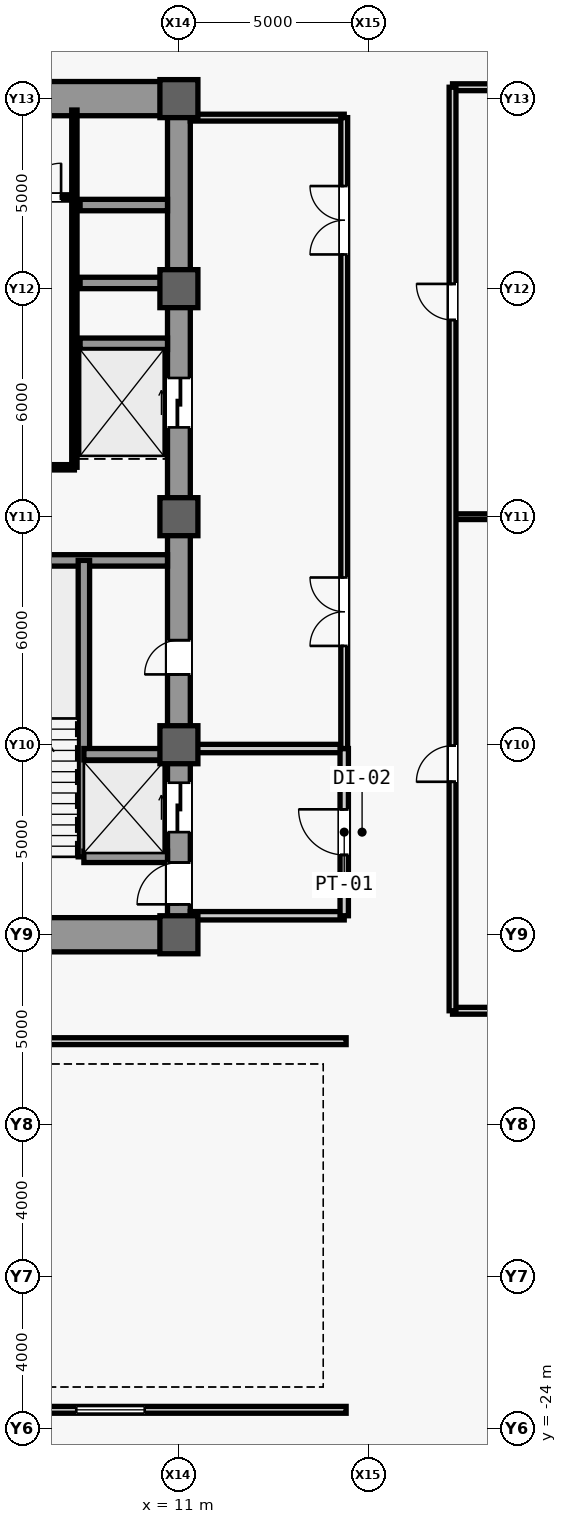
"""IFC4 building model, lengths in metres.
Left out: names, types, materials, properties, quantities, classifications, styles, units other than length and angle.
Written with IfcOpenShell. Run it as: python <this file> out.ifc"""

import sys

from ifc_helpers import new_model, si_unit, direction, frame, frame_2d, origin, origin_2d, place, context, subcontext, project, spatial, rectangle, extrude, source, transform, mapped, element, fill, save


model = new_model("IFC4")
c1 = context("Model", 3, precision=1e-05, world=origin(), true_north=direction((0.0, 1.0)))
c2 = subcontext(c1, "Body", "Model", "MODEL_VIEW")
j1 = project(units=[si_unit("LENGTHUNIT", "METRE"), si_unit("PLANEANGLEUNIT", "RADIAN")], contexts=[c1])
p1 = place(None, origin())
s1 = spatial("IfcSite", under=j1, at=p1, CompositionType="ELEMENT")
p2 = place(p1, origin())
s2 = spatial("IfcBuilding", under=s1, at=p2, CompositionType="ELEMENT")
p3 = place(p2, frame((0.0, 0.0, 17.4)))
s3 = spatial("IfcBuildingStorey", under=s2, at=p3, CompositionType="ELEMENT", Elevation=17.4)
m1 = source(origin(), c2, "Body", "SweptSolid", [
    extrude(rectangle(XDim=22.0, YDim=0.6, at=frame_2d((11.0, 0.0))), origin(), (0.0, 0.0, 1.0), 4.48),
])
p4 = place(p3, frame((11.0, -11.0, 0.0), z_axis=(0.0, 0.0, 1.0), x_axis=(0.0, 1.0, 0.0)))
e1 = element("IfcWall", 1, at=p4, inside=s3, PredefinedType="SHEAR", context=c2, shape_type="MappedRepresentation", body=[
    mapped(m1, transform((0.0, 0.0, 0.0), scale=1.0)),
])
m2 = source(origin(), c2, "Body", "SweptSolid", [
    extrude(rectangle(XDim=1.1, YDim=2.2, at=frame_2d((0.55, 1.1))), frame((0.0, 0.31, 0.0), z_axis=(0.0, -1.0, 0.0), x_axis=(1.0, 0.0, 0.0)), (0.0, 0.0, 1.0), 0.62),
])
p5 = place(p4, frame((0.8, 0.0, 0.0)))
e2 = element("IfcOpeningElement", 2, at=p5, cuts=e1, PredefinedType="OPENING", context=c2, shape_type="MappedRepresentation", body=[
    mapped(m2, transform((0.0, 0.0, 0.0), scale=1.0)),
])
m3 = source(origin(), c2, "Body", "SweptSolid", [
    extrude(rectangle(XDim=0.9, YDim=2.15, at=frame_2d((0.45, 1.075))), frame((0.0, 0.31, 0.0), z_axis=(0.0, -1.0, 0.0), x_axis=(1.0, 0.0, 0.0)), (0.0, 0.0, 1.0), 0.62),
])
p6 = place(p4, frame((6.85, 0.0, 0.0)))
e3 = element("IfcOpeningElement", 3, at=p6, cuts=e1, PredefinedType="OPENING", context=c2, shape_type="MappedRepresentation", body=[
    mapped(m3, transform((0.0, 0.0, 0.0), scale=1.0)),
])
m4 = source(origin(), c2, "Body", "SweptSolid", [
    extrude(rectangle(XDim=1.3, YDim=2.3, at=frame_2d((0.65, 1.15))), frame((0.0, 0.31, 0.0), z_axis=(0.0, -1.0, 0.0), x_axis=(1.0, 0.0, 0.0)), (0.0, 0.0, 1.0), 0.62),
])
p7 = place(p4, frame((2.7, 0.0, 0.0)))
e4 = element("IfcOpeningElement", 4, at=p7, cuts=e1, PredefinedType="OPENING", context=c2, shape_type="MappedRepresentation", body=[
    mapped(m4, transform((0.0, 0.0, 0.0), scale=1.0)),
])
p8 = place(p4, frame((13.35, 0.0, 0.0)))
e5 = element("IfcOpeningElement", 5, at=p8, cuts=e1, PredefinedType="OPENING", context=c2, shape_type="MappedRepresentation", body=[
    mapped(m4, transform((0.0, 0.0, 0.0), scale=1.0)),
])
m5 = source(origin(), c2, "Body", "SweptSolid", [
    extrude(rectangle(XDim=5.85, YDim=0.9, at=frame_2d((2.925, 0.0))), origin(), (0.0, 0.0, 1.0), 4.48),
])
p9 = place(p3, frame((4.85, -11.0, 0.0), z_axis=(0.0, 0.0, 1.0), x_axis=(1.0, 0.0, 0.0)))
e6 = element("IfcWall", 6, at=p9, inside=s3, PredefinedType="SHEAR", context=c2, shape_type="MappedRepresentation", body=[
    mapped(m5, transform((0.0, 0.0, 0.0), scale=1.0)),
])
p10 = place(p3, frame((4.85, 11.0, 0.0), z_axis=(0.0, 0.0, 1.0), x_axis=(1.0, 0.0, 0.0)))
e7 = element("IfcWall", 7, at=p10, inside=s3, PredefinedType="SHEAR", context=c2, shape_type="MappedRepresentation", body=[
    mapped(m5, transform((0.0, 0.0, 0.0), scale=1.0)),
])
m6 = source(origin(), c2, "Body", "SweptSolid", [
    extrude(rectangle(XDim=1.05, YDim=2.2, at=frame_2d((0.525, 1.1))), frame((0.0, 0.46, 0.0), z_axis=(0.0, -1.0, 0.0), x_axis=(1.0, 0.0, 0.0)), (0.0, 0.0, 1.0), 0.92),
])
p11 = place(p10, frame((1.375, 0.0, 0.0)))
e8 = element("IfcOpeningElement", 8, at=p11, cuts=e7, PredefinedType="OPENING", context=c2, shape_type="MappedRepresentation", body=[
    mapped(m6, transform((0.0, 0.0, 0.0), scale=1.0)),
])
m7 = source(origin(), c2, "Body", "SweptSolid", [
    extrude(rectangle(XDim=5.6, YDim=0.3, at=frame_2d((2.8, 0.0))), origin(), (0.0, 0.0, 1.0), 4.48),
])
p12 = place(p3, frame((5.1, -1.15, 0.0), z_axis=(0.0, 0.0, 1.0), x_axis=(1.0, 0.0, 0.0)))
e9 = element("IfcWall", 9, at=p12, inside=s3, PredefinedType="SHEAR", context=c2, shape_type="MappedRepresentation", body=[
    mapped(m7, transform((0.0, 0.0, 0.0), scale=1.0)),
])
m8 = source(origin(), c2, "Body", "SweptSolid", [
    extrude(rectangle(XDim=1.0, YDim=1.0, at=origin_2d()), origin(), (0.0, 0.0, 1.0), 4.8),
])
for number, where, z_axis, x_axis in (
    (10, (11.0, -11.0, 0.0), (0.0, 0.0, 1.0), (1.0, 0.0, 0.0)),
    (11, (11.0, -6.0, 0.0), (0.0, 0.0, 1.0), (1.0, 0.0, 0.0)),
    (12, (11.0, 0.0, 0.0), (0.0, 0.0, 1.0), (1.0, 0.0, 0.0)),
    (13, (11.0, 6.0, 0.0), (0.0, 0.0, 1.0), (1.0, 0.0, 0.0)),
    (14, (11.0, 11.0, 0.0), (0.0, 0.0, 1.0), (1.0, 0.0, 0.0)),
):
    element("IfcColumn", number, at=place(p3, frame(where, z_axis=z_axis, x_axis=x_axis)), inside=s3, PredefinedType="COLUMN", context=c2, shape_type="MappedRepresentation", body=[
        mapped(m8, transform((0.0, 0.0, 0.0), scale=1.0)),
    ])
m9 = source(origin(), c2, "Body", "SweptSolid", [
    extrude(rectangle(XDim=7.8, YDim=0.3, at=frame_2d((3.9, 0.0))), origin(), (0.0, 0.0, 1.0), 4.48),
])
p13 = place(p3, frame((8.5, -8.95, 0.0), z_axis=(0.0, 0.0, 1.0), x_axis=(0.0, 1.0, 0.0)))
e15 = element("IfcWall", 15, at=p13, inside=s3, PredefinedType="SHEAR", context=c2, shape_type="MappedRepresentation", body=[
    mapped(m9, transform((0.0, 0.0, 0.0), scale=1.0)),
])
m10 = source(origin(), c2, "Body", "SweptSolid", [
    extrude(rectangle(XDim=2.2, YDim=0.3, at=frame_2d((1.1, 0.0))), origin(), (0.0, 0.0, 1.0), 4.48),
])
for number, where, z_axis, x_axis in (
    (16, (8.5, -8.95, 0.0), (0.0, 0.0, 1.0), (1.0, 0.0, 0.0)),
    (17, (8.5, -6.25, 0.0), (0.0, 0.0, 1.0), (1.0, 0.0, 0.0)),
):
    element("IfcWall", number, at=place(p3, frame(where, z_axis=z_axis, x_axis=x_axis)), inside=s3, PredefinedType="SHEAR", context=c2, shape_type="MappedRepresentation", body=[
        mapped(m10, transform((0.0, 0.0, 0.0), scale=1.0)),
    ])
m11 = source(origin(), c2, "Body", "SweptSolid", [
    extrude(rectangle(XDim=2.3, YDim=0.3, at=frame_2d((1.15, 0.0))), origin(), (0.0, 0.0, 1.0), 4.48),
])
for number, where, z_axis, x_axis in (
    (18, (8.4, 4.55, 0.0), (0.0, 0.0, 1.0), (1.0, 0.0, 0.0)),
    (19, (8.4, 6.15, 0.0), (0.0, 0.0, 1.0), (1.0, 0.0, 0.0)),
    (20, (8.4, 8.2, 0.0), (0.0, 0.0, 1.0), (1.0, 0.0, 0.0)),
):
    element("IfcWall", number, at=place(p3, frame(where, z_axis=z_axis, x_axis=x_axis)), inside=s3, PredefinedType="SHEAR", context=c2, shape_type="MappedRepresentation", body=[
        mapped(m11, transform((0.0, 0.0, 0.0), scale=1.0)),
    ])
m12 = source(origin(), c2, "Body", "SweptSolid", [
    extrude(rectangle(XDim=9.4, YDim=0.14, at=frame_2d((4.7, 0.0))), origin(), (0.0, 0.0, 1.0), 4.48),
])
p14 = place(p3, frame((8.25, 1.3, 0.0), z_axis=(0.0, 0.0, 1.0), x_axis=(0.0, 1.0, 0.0)))
e21 = element("IfcWall", 21, at=p14, inside=s3, PredefinedType="PARTITIONING", context=c2, shape_type="MappedRepresentation", body=[
    mapped(m12, transform((0.0, 0.0, 0.0), scale=1.0)),
])
m13 = source(origin(), c2, "Body", "SweptSolid", [
    extrude(rectangle(XDim=3.15, YDim=0.14, at=frame_2d((1.575, 0.0))), origin(), (0.0, 0.0, 1.0), 4.48),
])
p15 = place(p3, frame((5.1, 1.3, 0.0), z_axis=(0.0, 0.0, 1.0), x_axis=(1.0, 0.0, 0.0)))
e22 = element("IfcWall", 22, at=p15, inside=s3, PredefinedType="PARTITIONING", context=c2, shape_type="MappedRepresentation", body=[
    mapped(m13, transform((0.0, 0.0, 0.0), scale=1.0)),
])
p16 = place(p3, frame((5.1, 8.4, 0.0), z_axis=(0.0, 0.0, 1.0), x_axis=(1.0, 0.0, 0.0)))
e23 = element("IfcWall", 23, at=p16, inside=s3, PredefinedType="PARTITIONING", context=c2, shape_type="MappedRepresentation", body=[
    mapped(m13, transform((0.0, 0.0, 0.0), scale=1.0)),
])
m14 = source(origin(), c2, "Body", "SweptSolid", [
    extrude(rectangle(XDim=0.9, YDim=2.15, at=frame_2d((0.45, 1.075))), frame((0.0, 0.08, 0.0), z_axis=(0.0, -1.0, 0.0), x_axis=(1.0, 0.0, 0.0)), (0.0, 0.0, 1.0), 0.16),
])
p17 = place(p16, frame((0.33, 0.0, 0.0)))
e24 = element("IfcOpeningElement", 24, at=p17, cuts=e23, PredefinedType="OPENING", context=c2, shape_type="MappedRepresentation", body=[
    mapped(m14, transform((0.0, 0.0, 0.0), scale=1.0)),
])
p18 = place(p16, frame((1.9, 0.0, 0.0)))
e25 = element("IfcOpeningElement", 25, at=p18, cuts=e23, PredefinedType="OPENING", context=c2, shape_type="MappedRepresentation", body=[
    mapped(m14, transform((0.0, 0.0, 0.0), scale=1.0)),
])
m15 = source(origin(), c2, "Body", "SweptSolid", [
    extrude(rectangle(XDim=4.05, YDim=0.22, at=frame_2d((2.025, 0.0))), origin(), (0.0, 0.0, 1.0), 4.48),
])
for number, where, z_axis, x_axis in (
    (26, (11.3, -10.5, 0.0), (0.0, 0.0, 1.0), (1.0, 0.0, 0.0)),
    (27, (11.3, -6.1, 0.0), (0.0, 0.0, 1.0), (1.0, 0.0, 0.0)),
):
    element("IfcWall", number, at=place(p3, frame(where, z_axis=z_axis, x_axis=x_axis)), inside=s3, PredefinedType="PARTITIONING", context=c2, shape_type="MappedRepresentation", body=[
        mapped(m15, transform((0.0, 0.0, 0.0), scale=1.0)),
    ])
m16 = source(origin(), c2, "Body", "SweptSolid", [
    extrude(rectangle(XDim=4.4, YDim=0.22, at=frame_2d((2.2, 0.0))), origin(), (0.0, 0.0, 1.0), 4.48),
])
p19 = place(p3, frame((15.35, -10.5, 0.0), z_axis=(0.0, 0.0, 1.0), x_axis=(0.0, 1.0, 0.0)))
e28 = element("IfcWall", 28, at=p19, inside=s3, PredefinedType="PARTITIONING", context=c2, shape_type="MappedRepresentation", body=[
    mapped(m16, transform((0.0, 0.0, 0.0), scale=1.0)),
])
m17 = source(origin(), c2, "Body", "SweptSolid", [
    extrude(rectangle(XDim=1.2, YDim=2.2, at=frame_2d((0.6, 1.1))), frame((0.0, 0.12, 0.0), z_axis=(0.0, -1.0, 0.0), x_axis=(1.0, 0.0, 0.0)), (0.0, 0.0, 1.0), 0.24),
])
p20 = place(p19, frame((1.6, 0.0, 0.0)))
e29 = element("IfcOpeningElement", 29, at=p20, cuts=e28, PredefinedType="OPENING", context=c2, shape_type="MappedRepresentation", body=[
    mapped(m17, transform((0.0, 0.0, 0.0), scale=1.0)),
])
m18 = source(origin(), c2, "Body", "SweptSolid", [
    extrude(rectangle(XDim=4.05, YDim=0.18, at=frame_2d((2.025, 0.0))), origin(), (0.0, 0.0, 1.0), 4.48),
])
p21 = place(p3, frame((11.3, 10.5, 0.0), z_axis=(0.0, 0.0, 1.0), x_axis=(1.0, 0.0, 0.0)))
e30 = element("IfcWall", 30, at=p21, inside=s3, PredefinedType="PARTITIONING", context=c2, shape_type="MappedRepresentation", body=[
    mapped(m18, transform((0.0, 0.0, 0.0), scale=1.0)),
])
m19 = source(origin(), c2, "Body", "SweptSolid", [
    extrude(rectangle(XDim=16.6, YDim=0.18, at=frame_2d((8.3, 0.0))), origin(), (0.0, 0.0, 1.0), 4.48),
])
p22 = place(p3, frame((15.35, -6.1, 0.0), z_axis=(0.0, 0.0, 1.0), x_axis=(0.0, 1.0, 0.0)))
e31 = element("IfcWall", 31, at=p22, inside=s3, PredefinedType="PARTITIONING", context=c2, shape_type="MappedRepresentation", body=[
    mapped(m19, transform((0.0, 0.0, 0.0), scale=1.0)),
])
m20 = source(origin(), c2, "Body", "SweptSolid", [
    extrude(rectangle(XDim=1.8, YDim=2.25, at=frame_2d((0.9, 1.125))), frame((0.0, 0.1, 0.0), z_axis=(0.0, -1.0, 0.0), x_axis=(1.0, 0.0, 0.0)), (0.0, 0.0, 1.0), 0.2),
])
p23 = place(p22, frame((2.7, 0.0, 0.0)))
e32 = element("IfcOpeningElement", 32, at=p23, cuts=e31, PredefinedType="OPENING", context=c2, shape_type="MappedRepresentation", body=[
    mapped(m20, transform((0.0, 0.0, 0.0), scale=1.0)),
])
p24 = place(p22, frame((13.0, 0.0, 0.0)))
e33 = element("IfcOpeningElement", 33, at=p24, cuts=e31, PredefinedType="OPENING", context=c2, shape_type="MappedRepresentation", body=[
    mapped(m20, transform((0.0, 0.0, 0.0), scale=1.0)),
])
m21 = source(origin(), c2, "Body", "SweptSolid", [
    extrude(rectangle(XDim=30.8, YDim=0.18, at=frame_2d((15.4, 0.0))), origin(), (0.0, 0.0, 1.0), 4.48),
])
p25 = place(p3, frame((-15.4, -13.8, 0.0), z_axis=(0.0, 0.0, 1.0), x_axis=(1.0, 0.0, 0.0)))
e34 = element("IfcWall", 34, at=p25, inside=s3, PredefinedType="PARTITIONING", context=c2, shape_type="MappedRepresentation", body=[
    mapped(m21, transform((0.0, 0.0, 0.0), scale=1.0)),
])
p26 = place(p25, frame((14.5, 0.0, 0.0)))
e35 = element("IfcOpeningElement", 35, at=p26, cuts=e34, PredefinedType="OPENING", context=c2, shape_type="MappedRepresentation", body=[
    mapped(m20, transform((0.0, 0.0, 0.0), scale=1.0)),
])
p27 = place(p3, frame((-15.4, -23.5, 0.0), z_axis=(0.0, 0.0, 1.0), x_axis=(1.0, 0.0, 0.0)))
e36 = element("IfcWall", 36, at=p27, inside=s3, PredefinedType="PARTITIONING", context=c2, shape_type="MappedRepresentation", body=[
    mapped(m21, transform((0.0, 0.0, 0.0), scale=1.0)),
])
m22 = source(origin(), c2, "Body", "SweptSolid", [
    extrude(rectangle(XDim=1.8, YDim=1.4, at=frame_2d((0.9, 0.7))), frame((0.0, 0.1, 0.0), z_axis=(0.0, -1.0, 0.0), x_axis=(1.0, 0.0, 0.0)), (0.0, 0.0, 1.0), 0.2),
])
p28 = place(p27, frame((3.5, 0.0, 0.9)))
e37 = element("IfcOpeningElement", 37, at=p28, cuts=e36, PredefinedType="OPENING", context=c2, shape_type="MappedRepresentation", body=[
    mapped(m22, transform((0.0, 0.0, 0.0), scale=1.0)),
])
p29 = place(p27, frame((14.5, 0.0, 0.9)))
e38 = element("IfcOpeningElement", 38, at=p29, cuts=e36, PredefinedType="OPENING", context=c2, shape_type="MappedRepresentation", body=[
    mapped(m22, transform((0.0, 0.0, 0.0), scale=1.0)),
])
p30 = place(p27, frame((23.7, 0.0, 0.9)))
e39 = element("IfcOpeningElement", 39, at=p30, cuts=e36, PredefinedType="OPENING", context=c2, shape_type="MappedRepresentation", body=[
    mapped(m22, transform((0.0, 0.0, 0.0), scale=1.0)),
])
m23 = source(origin(), c2, "Body", "SweptSolid", [
    extrude(rectangle(XDim=11.8, YDim=0.18, at=frame_2d((5.9, 0.0))), origin(), (0.0, 0.0, 1.0), 2.68),
])
p31 = place(p3, frame((18.2, 11.3, 0.0), z_axis=(0.0, 0.0, 1.0), x_axis=(1.0, 0.0, 0.0)))
e40 = element("IfcWall", 40, at=p31, inside=s3, PredefinedType="PARTITIONING", context=c2, shape_type="MappedRepresentation", body=[
    mapped(m23, transform((0.0, 0.0, 0.0), scale=1.0)),
])
m24 = source(origin(), c2, "Body", "SweptSolid", [
    extrude(rectangle(XDim=21.8, YDim=0.18, at=frame_2d((10.9, 0.0))), origin(), (0.0, 0.0, 1.0), 4.48),
])
p32 = place(p3, frame((18.2, -13.0, 0.0), z_axis=(0.0, 0.0, 1.0), x_axis=(1.0, 0.0, 0.0)))
e41 = element("IfcWall", 41, at=p32, inside=s3, PredefinedType="PARTITIONING", context=c2, shape_type="MappedRepresentation", body=[
    mapped(m24, transform((0.0, 0.0, 0.0), scale=1.0)),
])
m25 = source(origin(), c2, "Body", "SweptSolid", [
    extrude(rectangle(XDim=21.8, YDim=0.15, at=frame_2d((10.9, 0.0))), origin(), (0.0, 0.0, 1.0), 2.68),
])
p33 = place(p3, frame((18.2, 0.0, 0.0), z_axis=(0.0, 0.0, 1.0), x_axis=(1.0, 0.0, 0.0)))
e42 = element("IfcWall", 42, at=p33, inside=s3, PredefinedType="PARTITIONING", context=c2, shape_type="MappedRepresentation", body=[
    mapped(m25, transform((0.0, 0.0, 0.0), scale=1.0)),
])
m26 = source(origin(), c2, "Body", "SweptSolid", [
    extrude(rectangle(XDim=24.3, YDim=0.18, at=frame_2d((12.15, 0.0))), origin(), (0.0, 0.0, 1.0), 4.48),
])
p34 = place(p3, frame((18.2, -13.0, 0.0), z_axis=(0.0, 0.0, 1.0), x_axis=(0.0, 1.0, 0.0)))
e43 = element("IfcWall", 43, at=p34, inside=s3, PredefinedType="PARTITIONING", context=c2, shape_type="MappedRepresentation", body=[
    mapped(m26, transform((0.0, 0.0, 0.0), scale=1.0)),
])
m27 = source(origin(), c2, "Body", "SweptSolid", [
    extrude(rectangle(XDim=0.95, YDim=2.15, at=frame_2d((0.475, 1.075))), frame((0.0, 0.1, 0.0), z_axis=(0.0, -1.0, 0.0), x_axis=(1.0, 0.0, 0.0)), (0.0, 0.0, 1.0), 0.2),
])
p35 = place(p34, frame((6.025, 0.0, 0.0)))
e44 = element("IfcOpeningElement", 44, at=p35, cuts=e43, PredefinedType="OPENING", context=c2, shape_type="MappedRepresentation", body=[
    mapped(m27, transform((0.0, 0.0, 0.0), scale=1.0)),
])
p36 = place(p34, frame((18.175, 0.0, 0.0)))
e45 = element("IfcOpeningElement", 45, at=p36, cuts=e43, PredefinedType="OPENING", context=c2, shape_type="MappedRepresentation", body=[
    mapped(m27, transform((0.0, 0.0, 0.0), scale=1.0)),
])
m28 = source(origin(), c2, "Body", "SweptSolid", [
    extrude(rectangle(XDim=1.1, YDim=2.2, at=frame_2d((0.55, 1.1))), frame((0.0, 0.025, 0.0), z_axis=(0.0, -1.0, 0.0), x_axis=(1.0, 0.0, 0.0)), (0.0, 0.0, 1.0), 0.05),
])
p37 = place(p5, origin())
e46 = element("IfcDoor", 46, at=p37, inside=s3, OperationType="SINGLE_SWING_LEFT", PredefinedType="DOOR", context=c2, shape_type="MappedRepresentation", body=[
    mapped(m28, transform((0.0, 0.0, 0.0), scale=1.0)),
])
fill(e2, e46)
m29 = source(origin(), c2, "Body", "SweptSolid", [
    extrude(rectangle(XDim=0.9, YDim=2.15, at=frame_2d((0.45, 1.075))), frame((0.0, 0.025, 0.0), z_axis=(0.0, -1.0, 0.0), x_axis=(1.0, 0.0, 0.0)), (0.0, 0.0, 1.0), 0.05),
])
p38 = place(p6, origin())
e47 = element("IfcDoor", 47, at=p38, inside=s3, OperationType="SINGLE_SWING_LEFT", PredefinedType="DOOR", context=c2, shape_type="MappedRepresentation", body=[
    mapped(m29, transform((0.0, 0.0, 0.0), scale=1.0)),
])
fill(e3, e47)
p39 = place(p18, origin())
e48 = element("IfcDoor", 48, at=p39, inside=s3, OperationType="SINGLE_SWING_RIGHT", PredefinedType="DOOR", context=c2, shape_type="MappedRepresentation", body=[
    mapped(m29, transform((0.0, 0.0, 0.0), scale=1.0)),
])
fill(e25, e48)
m30 = source(origin(), c2, "Body", "SweptSolid", [
    extrude(rectangle(XDim=1.2, YDim=2.2, at=frame_2d((0.6, 1.1))), frame((0.0, 0.025, 0.0), z_axis=(0.0, -1.0, 0.0), x_axis=(1.0, 0.0, 0.0)), (0.0, 0.0, 1.0), 0.05),
])
p40 = place(p20, origin())
e49 = element("IfcDoor", 49, at=p40, inside=s3, OperationType="SINGLE_SWING_RIGHT", PredefinedType="DOOR", context=c2, shape_type="MappedRepresentation", body=[
    mapped(m30, transform((0.0, 0.0, 0.0), scale=1.0)),
])
fill(e29, e49)
m31 = source(origin(), c2, "Body", "SweptSolid", [
    extrude(rectangle(XDim=1.8, YDim=2.25, at=frame_2d((0.9, 1.125))), frame((0.0, 0.025, 0.0), z_axis=(0.0, -1.0, 0.0), x_axis=(1.0, 0.0, 0.0)), (0.0, 0.0, 1.0), 0.05),
])
p41 = place(p23, origin())
e50 = element("IfcDoor", 50, at=p41, inside=s3, OperationType="SINGLE_SWING_RIGHT", PredefinedType="DOOR", context=c2, shape_type="MappedRepresentation", body=[
    mapped(m31, transform((0.0, 0.0, 0.0), scale=1.0)),
])
fill(e32, e50)
p42 = place(p24, origin())
e51 = element("IfcDoor", 51, at=p42, inside=s3, OperationType="SINGLE_SWING_LEFT", PredefinedType="DOOR", context=c2, shape_type="MappedRepresentation", body=[
    mapped(m31, transform((0.0, 0.0, 0.0), scale=1.0)),
])
fill(e33, e51)
m32 = source(origin(), c2, "Body", "SweptSolid", [
    extrude(rectangle(XDim=0.95, YDim=2.15, at=frame_2d((0.475, 1.075))), frame((0.0, 0.025, 0.0), z_axis=(0.0, -1.0, 0.0), x_axis=(1.0, 0.0, 0.0)), (0.0, 0.0, 1.0), 0.05),
])
p43 = place(p35, origin())
e52 = element("IfcDoor", 52, at=p43, inside=s3, OperationType="SINGLE_SWING_LEFT", PredefinedType="DOOR", context=c2, shape_type="MappedRepresentation", body=[
    mapped(m32, transform((0.0, 0.0, 0.0), scale=1.0)),
])
fill(e44, e52)
p44 = place(p36, origin())
e53 = element("IfcDoor", 53, at=p44, inside=s3, OperationType="SINGLE_SWING_RIGHT", PredefinedType="DOOR", context=c2, shape_type="MappedRepresentation", body=[
    mapped(m32, transform((0.0, 0.0, 0.0), scale=1.0)),
])
fill(e45, e53)
m33 = source(origin(), c2, "Body", "SweptSolid", [
    extrude(rectangle(XDim=1.8, YDim=1.4, at=frame_2d((0.9, 0.7))), frame((0.0, 0.03, 0.0), z_axis=(0.0, -1.0, 0.0), x_axis=(1.0, 0.0, 0.0)), (0.0, 0.0, 1.0), 0.06),
])
p45 = place(p30, origin())
e54 = element("IfcWindow", 54, at=p45, inside=s3, PartitioningType="SINGLE_PANEL", PredefinedType="WINDOW", context=c2, shape_type="MappedRepresentation", body=[
    mapped(m33, transform((0.0, 0.0, 0.0), scale=1.0)),
])
fill(e39, e54)
m34 = source(origin(), c2, "Body", "SweptSolid", [
    extrude(rectangle(XDim=1.3, YDim=2.3, at=frame_2d((0.65, 1.15))), frame((0.0, 0.025, 0.0), z_axis=(0.0, -1.0, 0.0), x_axis=(1.0, 0.0, 0.0)), (0.0, 0.0, 1.0), 0.05),
])
p46 = place(p7, origin())
e55 = element("IfcDoor", 55, at=p46, inside=s3, OperationType="SLIDING_TO_LEFT", PredefinedType="DOOR", context=c2, shape_type="MappedRepresentation", body=[
    mapped(m34, transform((0.0, 0.0, 0.0), scale=1.0)),
])
fill(e4, e55)
p47 = place(p8, origin())
e56 = element("IfcDoor", 56, at=p47, inside=s3, OperationType="SLIDING_TO_LEFT", PredefinedType="DOOR", context=c2, shape_type="MappedRepresentation", body=[
    mapped(m34, transform((0.0, 0.0, 0.0), scale=1.0)),
])
fill(e5, e56)
save(model, sys.argv[1])
